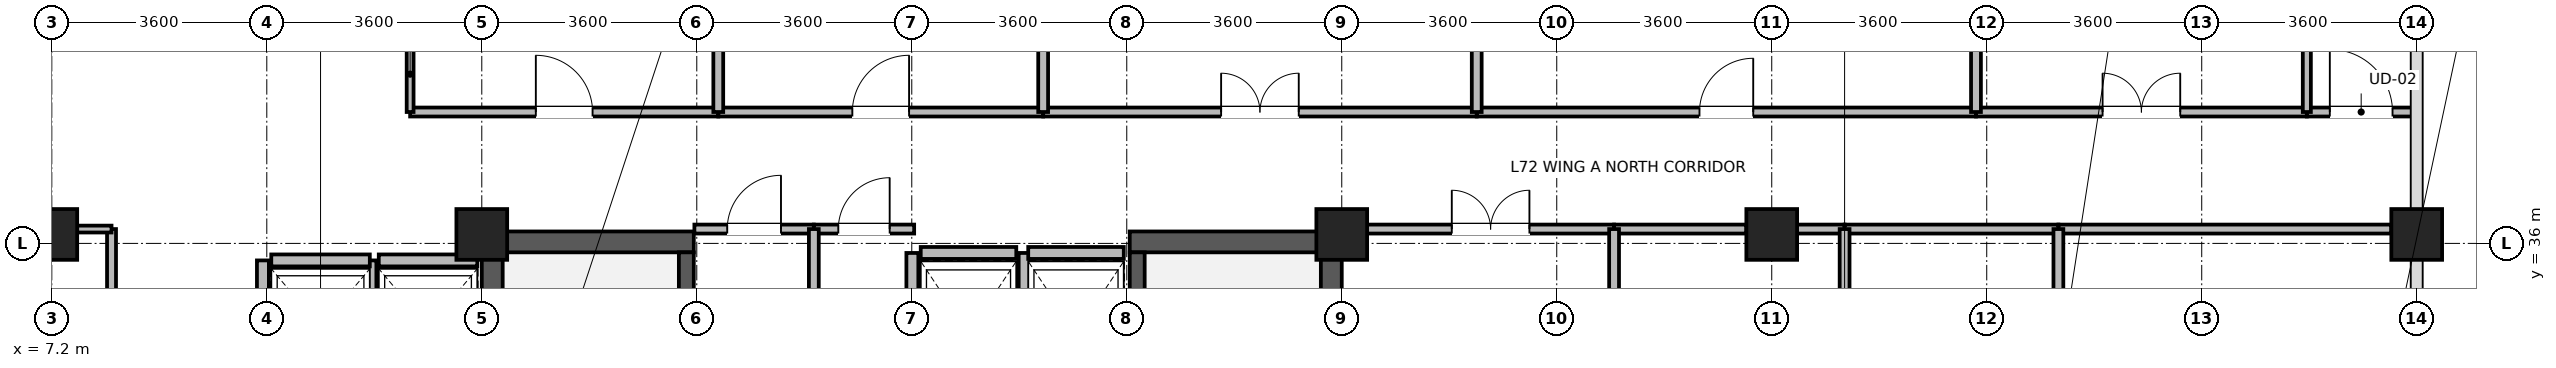
"""IFC4 building model, lengths in metres.
Left out: names, types, materials, properties, quantities, classifications, styles, units other than length and angle.
Written with IfcOpenShell. Run it as: python <this file> out.ifc"""

import sys

from ifc_helpers import new_model, si_unit, direction, frame, frame_2d, origin, origin_2d, place, context, subcontext, project, spatial, rectangle, extrude, source, transform, mapped, element, fill, save


model = new_model("IFC4")
c1 = context("Model", 3, precision=1e-05, world=origin(), true_north=direction((0.0, 1.0)))
c2 = subcontext(c1, "Body", "Model", "MODEL_VIEW")
j1 = project(units=[si_unit("LENGTHUNIT", "METRE"), si_unit("PLANEANGLEUNIT", "RADIAN")], contexts=[c1])
p1 = place(None, origin())
s1 = spatial("IfcSite", under=j1, at=p1, CompositionType="ELEMENT")
p2 = place(p1, origin())
s2 = spatial("IfcBuilding", under=s1, at=p2, CompositionType="ELEMENT")
p3 = place(p2, frame((0.0, 0.0, 279.5)))
s3 = spatial("IfcBuildingStorey", under=s2, at=p3, CompositionType="ELEMENT", Elevation=279.5)
for number, where, z_axis, x_axis in (
    (1, (14.575, 28.5, 0.0), (0.0, 0.0, 1.0), (0.0, 1.0, 0.0)),
    (2, (28.625, 28.5, 0.0), (0.0, 0.0, 1.0), (0.0, 1.0, 0.0)),
):
    element("IfcWall", number, at=place(p3, frame(where, z_axis=z_axis, x_axis=x_axis)), inside=s3, PredefinedType="SHEAR", context=c2, shape_type="SweptSolid", body=[
        extrude(rectangle(XDim=7.7, YDim=0.35, at=frame_2d((3.85, 0.0))), origin(), (0.0, 0.0, 1.0), 3.475),
    ])
for number, where, z_axis, x_axis in (
    (3, (14.75, 36.025, 0.0), (0.0, 0.0, 1.0), (1.0, 0.0, 0.0)),
    (4, (25.25, 36.025, 0.0), (0.0, 0.0, 1.0), (1.0, 0.0, 0.0)),
):
    element("IfcWall", number, at=place(p3, frame(where, z_axis=z_axis, x_axis=x_axis)), inside=s3, PredefinedType="SHEAR", context=c2, shape_type="SweptSolid", body=[
        extrude(rectangle(XDim=3.2, YDim=0.35, at=frame_2d((1.6, 0.0))), origin(), (0.0, 0.0, 1.0), 3.475),
    ])
p4 = place(p3, frame((17.825, 28.85, 0.0), z_axis=(0.0, 0.0, 1.0), x_axis=(0.0, 1.0, 0.0)))
e5 = element("IfcWall", 5, at=p4, inside=s3, PredefinedType="SHEAR", context=c2, shape_type="SweptSolid", body=[
    extrude(rectangle(XDim=7.0, YDim=0.25, at=frame_2d((3.5, 0.0))), origin(), (0.0, 0.0, 1.0), 3.475),
])
p5 = place(p4, frame((0.15, 0.0, 0.0)))
e6 = element("IfcOpeningElement", 6, at=p5, cuts=e5, PredefinedType="OPENING", context=c2, shape_type="SweptSolid", body=[
    extrude(rectangle(XDim=1.1, YDim=2.08, at=frame_2d((0.55, 1.04))), frame((0.0, 0.135, 0.0), z_axis=(0.0, -1.0, 0.0), x_axis=(1.0, 0.0, 0.0)), (0.0, 0.0, 1.0), 0.27),
])
p6 = place(p3, frame((25.375, 28.85, 0.0), z_axis=(0.0, 0.0, 1.0), x_axis=(0.0, 1.0, 0.0)))
e7 = element("IfcWall", 7, at=p6, inside=s3, PredefinedType="SHEAR", context=c2, shape_type="SweptSolid", body=[
    extrude(rectangle(XDim=7.0, YDim=0.25, at=frame_2d((3.5, 0.0))), origin(), (0.0, 0.0, 1.0), 3.475),
])
p7 = place(p6, frame((0.15, 0.0, 0.0)))
e8 = element("IfcOpeningElement", 8, at=p7, cuts=e7, PredefinedType="OPENING", context=c2, shape_type="SweptSolid", body=[
    extrude(rectangle(XDim=1.1, YDim=2.08, at=frame_2d((0.55, 1.04))), frame((0.0, 0.135, 0.0), z_axis=(0.0, -1.0, 0.0), x_axis=(1.0, 0.0, 0.0)), (0.0, 0.0, 1.0), 0.27),
])
m1 = source(origin(), c2, "Body", "SweptSolid", [
    extrude(rectangle(XDim=0.85, YDim=0.85, at=origin_2d()), origin(), (0.0, 0.0, 1.0), 3.7),
])
for number, where, z_axis, x_axis in (
    (9, (7.2, 36.15, 0.0), (0.0, 0.0, 1.0), (1.0, 0.0, 0.0)),
    (10, (14.4, 36.15, 0.0), (0.0, 0.0, 1.0), (1.0, 0.0, 0.0)),
    (11, (28.8, 36.15, 0.0), (0.0, 0.0, 1.0), (1.0, 0.0, 0.0)),
    (12, (36.0, 36.15, 0.0), (0.0, 0.0, 1.0), (1.0, 0.0, 0.0)),
    (13, (46.8, 36.15, 0.0), (0.0, 0.0, 1.0), (1.0, 0.0, 0.0)),
):
    element("IfcColumn", number, at=place(p3, frame(where, z_axis=z_axis, x_axis=x_axis)), inside=s3, PredefinedType="COLUMN", context=c2, shape_type="MappedRepresentation", body=[
        mapped(m1, transform((0.0, 0.0, 0.0), x_axis=(1.0, 0.0, 0.0), y_axis=(0.0, 1.0, 0.0), z_axis=(0.0, 0.0, 1.0), scale=1.0)),
    ])
p8 = place(p3, frame((12.675, 35.715, 0.0), z_axis=(0.0, 0.0, 1.0), x_axis=(1.0, 0.0, 0.0)))
e14 = element("IfcWall", 14, at=p8, inside=s3, PredefinedType="PARTITIONING", context=c2, shape_type="SweptSolid", body=[
    extrude(rectangle(XDim=1.65, YDim=0.2, at=frame_2d((0.825, 0.0))), origin(), (0.0, 0.0, 1.0), 3.455),
])
p9 = place(p3, frame((12.535, 33.485, 0.0), z_axis=(0.0, 0.0, 1.0), x_axis=(0.0, 1.0, 0.0)))
e15 = element("IfcWall", 15, at=p9, inside=s3, PredefinedType="PARTITIONING", context=c2, shape_type="SweptSolid", body=[
    extrude(rectangle(XDim=2.23, YDim=0.2, at=frame_2d((1.115, 0.0))), origin(), (0.0, 0.0, 1.0), 3.455),
])
p10 = place(p3, frame((10.875, 35.715, 0.0), z_axis=(0.0, 0.0, 1.0), x_axis=(1.0, 0.0, 0.0)))
e16 = element("IfcWall", 16, at=p10, inside=s3, PredefinedType="PARTITIONING", context=c2, shape_type="SweptSolid", body=[
    extrude(rectangle(XDim=1.65, YDim=0.2, at=frame_2d((0.825, 0.0))), origin(), (0.0, 0.0, 1.0), 3.455),
])
p11 = place(p3, frame((10.735, 33.485, 0.0), z_axis=(0.0, 0.0, 1.0), x_axis=(0.0, 1.0, 0.0)))
e17 = element("IfcWall", 17, at=p11, inside=s3, PredefinedType="PARTITIONING", context=c2, shape_type="SweptSolid", body=[
    extrude(rectangle(XDim=2.23, YDim=0.2, at=frame_2d((1.115, 0.0))), origin(), (0.0, 0.0, 1.0), 3.455),
])
p12 = place(p3, frame((21.75, 35.84, 0.0), z_axis=(0.0, 0.0, 1.0), x_axis=(1.0, 0.0, 0.0)))
e18 = element("IfcWall", 18, at=p12, inside=s3, PredefinedType="PARTITIONING", context=c2, shape_type="SweptSolid", body=[
    extrude(rectangle(XDim=1.6, YDim=0.2, at=frame_2d((0.8, 0.0))), origin(), (0.0, 0.0, 1.0), 2.555),
])
for number, where, z_axis, x_axis in (
    (19, (21.61, 33.16, 0.0), (0.0, 0.0, 1.0), (0.0, 1.0, 0.0)),
    (20, (23.49, 33.16, 0.0), (0.0, 0.0, 1.0), (0.0, 1.0, 0.0)),
):
    element("IfcWall", number, at=place(p3, frame(where, z_axis=z_axis, x_axis=x_axis)), inside=s3, PredefinedType="PARTITIONING", context=c2, shape_type="SweptSolid", body=[
        extrude(rectangle(XDim=2.68, YDim=0.2, at=frame_2d((1.34, 0.0))), origin(), (0.0, 0.0, 1.0), 3.455),
    ])
p13 = place(p3, frame((23.55, 35.84, 0.0), z_axis=(0.0, 0.0, 1.0), x_axis=(1.0, 0.0, 0.0)))
e21 = element("IfcWall", 21, at=p13, inside=s3, PredefinedType="PARTITIONING", context=c2, shape_type="SweptSolid", body=[
    extrude(rectangle(XDim=1.6, YDim=0.2, at=frame_2d((0.8, 0.0))), origin(), (0.0, 0.0, 1.0), 2.555),
])
p14 = place(p3, frame((31.06, 38.2, 0.0), z_axis=(0.0, 0.0, 1.0), x_axis=(1.0, 0.0, 0.0)))
e22 = element("IfcWall", 22, at=p14, inside=s3, PredefinedType="PARTITIONING", context=c2, shape_type="SweptSolid", body=[
    extrude(rectangle(XDim=8.36, YDim=0.15, at=frame_2d((4.18, 0.0))), origin(), (0.0, 0.0, 1.0), 3.455),
])
p15 = place(p14, frame((3.73, 0.0, 0.0)))
e23 = element("IfcOpeningElement", 23, at=p15, cuts=e22, PredefinedType="OPENING", context=c2, shape_type="SweptSolid", body=[
    extrude(rectangle(XDim=0.9, YDim=2.08, at=frame_2d((0.45, 1.04))), frame((0.0, 0.085, 0.0), z_axis=(0.0, -1.0, 0.0), x_axis=(1.0, 0.0, 0.0)), (0.0, 0.0, 1.0), 0.17),
])
p16 = place(p3, frame((23.8, 38.2, 0.0), z_axis=(0.0, 0.0, 1.0), x_axis=(1.0, 0.0, 0.0)))
e24 = element("IfcWall", 24, at=p16, inside=s3, PredefinedType="PARTITIONING", context=c2, shape_type="SweptSolid", body=[
    extrude(rectangle(XDim=7.26, YDim=0.15, at=frame_2d((3.63, 0.0))), origin(), (0.0, 0.0, 1.0), 3.455),
])
p17 = place(p16, frame((2.98, 0.0, 0.0)))
e25 = element("IfcOpeningElement", 25, at=p17, cuts=e24, PredefinedType="OPENING", context=c2, shape_type="SweptSolid", body=[
    extrude(rectangle(XDim=1.3, YDim=2.12, at=frame_2d((0.65, 1.06))), frame((0.0, 0.085, 0.0), z_axis=(0.0, -1.0, 0.0), x_axis=(1.0, 0.0, 0.0)), (0.0, 0.0, 1.0), 0.17),
])
p18 = place(p3, frame((40.8, 36.24, 0.0), z_axis=(0.0, 0.0, 1.0), x_axis=(1.0, 0.0, 0.0)))
e26 = element("IfcWall", 26, at=p18, inside=s3, PredefinedType="PARTITIONING", context=c2, shape_type="SweptSolid", body=[
    extrude(rectangle(XDim=5.575, YDim=0.15, at=frame_2d((2.788, 0.0))), origin(), (0.0, 0.0, 1.0), 2.905),
])
p19 = place(p3, frame((39.42, 38.2, 0.0), z_axis=(0.0, 0.0, 1.0), x_axis=(1.0, 0.0, 0.0)))
e27 = element("IfcWall", 27, at=p19, inside=s3, PredefinedType="PARTITIONING", context=c2, shape_type="SweptSolid", body=[
    extrude(rectangle(XDim=5.54, YDim=0.15, at=frame_2d((2.77, 0.0))), origin(), (0.0, 0.0, 1.0), 3.455),
])
p20 = place(p19, frame((2.12, 0.0, 0.0)))
e28 = element("IfcOpeningElement", 28, at=p20, cuts=e27, PredefinedType="OPENING", context=c2, shape_type="SweptSolid", body=[
    extrude(rectangle(XDim=1.3, YDim=2.12, at=frame_2d((0.65, 1.06))), frame((0.0, 0.085, 0.0), z_axis=(0.0, -1.0, 0.0), x_axis=(1.0, 0.0, 0.0)), (0.0, 0.0, 1.0), 0.17),
])
p21 = place(p3, frame((18.36, 38.2, 0.0), z_axis=(0.0, 0.0, 1.0), x_axis=(1.0, 0.0, 0.0)))
e29 = element("IfcWall", 29, at=p21, inside=s3, PredefinedType="PARTITIONING", context=c2, shape_type="SweptSolid", body=[
    extrude(rectangle(XDim=5.44, YDim=0.15, at=frame_2d((2.72, 0.0))), origin(), (0.0, 0.0, 1.0), 3.455),
])
p22 = place(p21, frame((2.245, 0.0, 0.0)))
e30 = element("IfcOpeningElement", 30, at=p22, cuts=e29, PredefinedType="OPENING", context=c2, shape_type="SweptSolid", body=[
    extrude(rectangle(XDim=0.95, YDim=2.1, at=frame_2d((0.475, 1.05))), frame((0.0, 0.085, 0.0), z_axis=(0.0, -1.0, 0.0), x_axis=(1.0, 0.0, 0.0)), (0.0, 0.0, 1.0), 0.17),
])
p23 = place(p3, frame((13.2, 38.2, 0.0), z_axis=(0.0, 0.0, 1.0), x_axis=(1.0, 0.0, 0.0)))
e31 = element("IfcWall", 31, at=p23, inside=s3, PredefinedType="PARTITIONING", context=c2, shape_type="SweptSolid", body=[
    extrude(rectangle(XDim=5.16, YDim=0.15, at=frame_2d((2.58, 0.0))), origin(), (0.0, 0.0, 1.0), 3.455),
])
p24 = place(p23, frame((2.105, 0.0, 0.0)))
e32 = element("IfcOpeningElement", 32, at=p24, cuts=e31, PredefinedType="OPENING", context=c2, shape_type="SweptSolid", body=[
    extrude(rectangle(XDim=0.95, YDim=2.1, at=frame_2d((0.475, 1.05))), frame((0.0, 0.085, 0.0), z_axis=(0.0, -1.0, 0.0), x_axis=(1.0, 0.0, 0.0)), (0.0, 0.0, 1.0), 0.17),
])
p25 = place(p3, frame((29.225, 36.24, 0.0), z_axis=(0.0, 0.0, 1.0), x_axis=(1.0, 0.0, 0.0)))
e33 = element("IfcWall", 33, at=p25, inside=s3, PredefinedType="PARTITIONING", context=c2, shape_type="SweptSolid", body=[
    extrude(rectangle(XDim=4.135, YDim=0.15, at=frame_2d((2.067, 0.0))), origin(), (0.0, 0.0, 1.0), 2.905),
])
p26 = place(p25, frame((1.417, 0.0, 0.0)))
e34 = element("IfcOpeningElement", 34, at=p26, cuts=e33, PredefinedType="OPENING", context=c2, shape_type="SweptSolid", body=[
    extrude(rectangle(XDim=1.3, YDim=2.12, at=frame_2d((0.65, 1.06))), frame((0.0, 0.085, 0.0), z_axis=(0.0, -1.0, 0.0), x_axis=(1.0, 0.0, 0.0)), (0.0, 0.0, 1.0), 0.17),
])
p27 = place(p3, frame((33.36, 36.24, 0.0), z_axis=(0.0, 0.0, 1.0), x_axis=(1.0, 0.0, 0.0)))
e35 = element("IfcWall", 35, at=p27, inside=s3, PredefinedType="PARTITIONING", context=c2, shape_type="SweptSolid", body=[
    extrude(rectangle(XDim=2.215, YDim=0.15, at=frame_2d((1.107, 0.0))), origin(), (0.0, 0.0, 1.0), 2.905),
])
p28 = place(p3, frame((36.425, 36.24, 0.0), z_axis=(0.0, 0.0, 1.0), x_axis=(1.0, 0.0, 0.0)))
e36 = element("IfcWall", 36, at=p28, inside=s3, PredefinedType="PARTITIONING", context=c2, shape_type="SweptSolid", body=[
    extrude(rectangle(XDim=0.795, YDim=0.15, at=frame_2d((0.397, 0.0))), origin(), (0.0, 0.0, 1.0), 2.905),
])
p29 = place(p3, frame((8.2, 32.4, 0.0), z_axis=(0.0, 0.0, 1.0), x_axis=(0.0, 1.0, 0.0)))
e37 = element("IfcWall", 37, at=p29, inside=s3, PredefinedType="PARTITIONING", context=c2, shape_type="SweptSolid", body=[
    extrude(rectangle(XDim=3.84, YDim=0.15, at=frame_2d((1.92, 0.0))), origin(), (0.0, 0.0, 1.0), 3.455),
])
p30 = place(p29, frame((1.445, 0.0, 0.0)))
e38 = element("IfcOpeningElement", 38, at=p30, cuts=e37, PredefinedType="OPENING", context=c2, shape_type="SweptSolid", body=[
    extrude(rectangle(XDim=0.95, YDim=2.1, at=frame_2d((0.475, 1.05))), frame((0.0, 0.085, 0.0), z_axis=(0.0, -1.0, 0.0), x_axis=(1.0, 0.0, 0.0)), (0.0, 0.0, 1.0), 0.17),
])
p31 = place(p3, frame((37.22, 36.24, 0.0), z_axis=(0.0, 0.0, 1.0), x_axis=(1.0, 0.0, 0.0)))
e39 = element("IfcWall", 39, at=p31, inside=s3, PredefinedType="PARTITIONING", context=c2, shape_type="SweptSolid", body=[
    extrude(rectangle(XDim=3.58, YDim=0.15, at=frame_2d((1.79, 0.0))), origin(), (0.0, 0.0, 1.0), 2.905),
])
p32 = place(p3, frame((17.96, 36.24, 0.0), z_axis=(0.0, 0.0, 1.0), x_axis=(1.0, 0.0, 0.0)))
e40 = element("IfcWall", 40, at=p32, inside=s3, PredefinedType="PARTITIONING", context=c2, shape_type="SweptSolid", body=[
    extrude(rectangle(XDim=2.0, YDim=0.15, at=frame_2d((1.0, 0.0))), origin(), (0.0, 0.0, 1.0), 2.555),
])
p33 = place(p32, frame((0.55, 0.0, 0.0)))
e41 = element("IfcOpeningElement", 41, at=p33, cuts=e40, PredefinedType="OPENING", context=c2, shape_type="SweptSolid", body=[
    extrude(rectangle(XDim=0.9, YDim=2.08, at=frame_2d((0.45, 1.04))), frame((0.0, 0.085, 0.0), z_axis=(0.0, -1.0, 0.0), x_axis=(1.0, 0.0, 0.0)), (0.0, 0.0, 1.0), 0.17),
])
p34 = place(p3, frame((44.96, 38.2, 0.0), z_axis=(0.0, 0.0, 1.0), x_axis=(1.0, 0.0, 0.0)))
e42 = element("IfcWall", 42, at=p34, inside=s3, PredefinedType="PARTITIONING", context=c2, shape_type="SweptSolid", body=[
    extrude(rectangle(XDim=1.82, YDim=0.15, at=frame_2d((0.91, 0.0))), origin(), (0.0, 0.0, 1.0), 3.455),
])
p35 = place(p34, frame((0.385, 0.0, 0.0)))
e43 = element("IfcOpeningElement", 43, at=p35, cuts=e42, PredefinedType="OPENING", context=c2, shape_type="SweptSolid", body=[
    extrude(rectangle(XDim=1.05, YDim=2.12, at=frame_2d((0.525, 1.06))), frame((0.0, 0.085, 0.0), z_axis=(0.0, -1.0, 0.0), x_axis=(1.0, 0.0, 0.0)), (0.0, 0.0, 1.0), 0.17),
])
p36 = place(p3, frame((19.96, 36.24, 0.0), z_axis=(0.0, 0.0, 1.0), x_axis=(1.0, 0.0, 0.0)))
e44 = element("IfcWall", 44, at=p36, inside=s3, PredefinedType="PARTITIONING", context=c2, shape_type="SweptSolid", body=[
    extrude(rectangle(XDim=1.68, YDim=0.15, at=frame_2d((0.84, 0.0))), origin(), (0.0, 0.0, 1.0), 2.555),
])
p37 = place(p36, frame((0.41, 0.0, 0.0)))
e45 = element("IfcOpeningElement", 45, at=p37, cuts=e44, PredefinedType="OPENING", context=c2, shape_type="SweptSolid", body=[
    extrude(rectangle(XDim=0.86, YDim=2.02, at=frame_2d((0.43, 1.01))), frame((0.0, 0.085, 0.0), z_axis=(0.0, -1.0, 0.0), x_axis=(1.0, 0.0, 0.0)), (0.0, 0.0, 1.0), 0.17),
])
for number, where, z_axis, x_axis in (
    (46, (37.22, 28.56, 0.0), (0.0, 0.0, 1.0), (0.0, 1.0, 0.0)),
    (47, (40.8, 28.56, 0.0), (0.0, 0.0, 1.0), (0.0, 1.0, 0.0)),
):
    element("IfcWall", number, at=place(p3, frame(where, z_axis=z_axis, x_axis=x_axis)), inside=s3, PredefinedType="PARTITIONING", context=c2, shape_type="SweptSolid", body=[
        extrude(rectangle(XDim=7.68, YDim=0.165, at=frame_2d((3.84, 0.0))), origin(), (0.0, 0.0, 1.0), 3.455),
    ])
p38 = place(p3, frame((13.2, 38.2, 0.0), z_axis=(0.0, 0.0, 1.0), x_axis=(0.0, 1.0, 0.0)))
e48 = element("IfcWall", 48, at=p38, inside=s3, PredefinedType="PARTITIONING", context=c2, shape_type="SweptSolid", body=[
    extrude(rectangle(XDim=1.268, YDim=0.115, at=frame_2d((0.634, 0.0))), origin(), (0.0, 0.0, 1.0), 3.455),
])
for number, where, z_axis, x_axis in (
    (49, (18.36, 38.2, 0.0), (0.0, 0.0, 1.0), (0.0, 1.0, 0.0)),
    (50, (23.8, 38.2, 0.0), (0.0, 0.0, 1.0), (0.0, 1.0, 0.0)),
    (51, (31.06, 38.2, 0.0), (0.0, 0.0, 1.0), (0.0, 1.0, 0.0)),
    (52, (39.42, 38.2, 0.0), (0.0, 0.0, 1.0), (0.0, 1.0, 0.0)),
):
    element("IfcWall", number, at=place(p3, frame(where, z_axis=z_axis, x_axis=x_axis)), inside=s3, PredefinedType="PARTITIONING", context=c2, shape_type="SweptSolid", body=[
        extrude(rectangle(XDim=4.868, YDim=0.165, at=frame_2d((2.434, 0.0))), origin(), (0.0, 0.0, 1.0), 3.455),
    ])
p39 = place(p3, frame((44.96, 38.2, 0.0), z_axis=(0.0, 0.0, 1.0), x_axis=(0.0, 1.0, 0.0)))
e53 = element("IfcWall", 53, at=p39, inside=s3, PredefinedType="PARTITIONING", context=c2, shape_type="SweptSolid", body=[
    extrude(rectangle(XDim=4.868, YDim=0.135, at=frame_2d((2.434, 0.0))), origin(), (0.0, 0.0, 1.0), 3.455),
])
p40 = place(p3, frame((7.625, 36.24, 0.0), z_axis=(0.0, 0.0, 1.0), x_axis=(1.0, 0.0, 0.0)))
e54 = element("IfcWall", 54, at=p40, inside=s3, PredefinedType="PARTITIONING", context=c2, shape_type="SweptSolid", body=[
    extrude(rectangle(XDim=0.575, YDim=0.115, at=frame_2d((0.288, 0.0))), origin(), (0.0, 0.0, 1.0), 2.905),
])
p41 = place(p3, frame((33.36, 32.4, 0.0), z_axis=(0.0, 0.0, 1.0), x_axis=(0.0, 1.0, 0.0)))
e55 = element("IfcWall", 55, at=p41, inside=s3, PredefinedType="PARTITIONING", context=c2, shape_type="SweptSolid", body=[
    extrude(rectangle(XDim=3.84, YDim=0.165, at=frame_2d((1.92, 0.0))), origin(), (0.0, 0.0, 1.0), 3.455),
])
p42 = place(p3, frame((19.96, 33.36, 0.0), z_axis=(0.0, 0.0, 1.0), x_axis=(0.0, 1.0, 0.0)))
e56 = element("IfcWall", 56, at=p42, inside=s3, PredefinedType="PARTITIONING", context=c2, shape_type="SweptSolid", body=[
    extrude(rectangle(XDim=2.88, YDim=0.165, at=frame_2d((1.44, 0.0))), origin(), (0.0, 0.0, 1.0), 3.455),
])
p43 = place(p15, origin())
e57 = element("IfcDoor", 57, at=p43, inside=s3, OperationType="SINGLE_SWING_RIGHT", PredefinedType="DOOR", context=c2, shape_type="SweptSolid", body=[
    extrude(rectangle(XDim=0.9, YDim=2.08, at=frame_2d((0.45, 1.04))), frame((0.0, 0.025, 0.0), z_axis=(0.0, -1.0, 0.0), x_axis=(1.0, 0.0, 0.0)), (0.0, 0.0, 1.0), 0.05),
])
fill(e23, e57)
p44 = place(p17, origin())
e58 = element("IfcDoor", 58, at=p44, inside=s3, OperationType="DOUBLE_DOOR_SINGLE_SWING", PredefinedType="DOOR", context=c2, shape_type="SweptSolid", body=[
    extrude(rectangle(XDim=1.3, YDim=2.12, at=frame_2d((0.65, 1.06))), frame((0.0, 0.025, 0.0), z_axis=(0.0, -1.0, 0.0), x_axis=(1.0, 0.0, 0.0)), (0.0, 0.0, 1.0), 0.05),
])
fill(e25, e58)
p45 = place(p20, origin())
e59 = element("IfcDoor", 59, at=p45, inside=s3, OperationType="DOUBLE_DOOR_SINGLE_SWING", PredefinedType="DOOR", context=c2, shape_type="SweptSolid", body=[
    extrude(rectangle(XDim=1.3, YDim=2.12, at=frame_2d((0.65, 1.06))), frame((0.0, 0.025, 0.0), z_axis=(0.0, -1.0, 0.0), x_axis=(1.0, 0.0, 0.0)), (0.0, 0.0, 1.0), 0.05),
])
fill(e28, e59)
p46 = place(p22, origin())
e60 = element("IfcDoor", 60, at=p46, inside=s3, OperationType="SINGLE_SWING_RIGHT", PredefinedType="DOOR", context=c2, shape_type="SweptSolid", body=[
    extrude(rectangle(XDim=0.95, YDim=2.1, at=frame_2d((0.475, 1.05))), frame((0.0, 0.025, 0.0), z_axis=(0.0, -1.0, 0.0), x_axis=(1.0, 0.0, 0.0)), (0.0, 0.0, 1.0), 0.05),
])
fill(e30, e60)
p47 = place(p24, origin())
e61 = element("IfcDoor", 61, at=p47, inside=s3, OperationType="SINGLE_SWING_LEFT", PredefinedType="DOOR", context=c2, shape_type="SweptSolid", body=[
    extrude(rectangle(XDim=0.95, YDim=2.1, at=frame_2d((0.475, 1.05))), frame((0.0, 0.025, 0.0), z_axis=(0.0, -1.0, 0.0), x_axis=(1.0, 0.0, 0.0)), (0.0, 0.0, 1.0), 0.05),
])
fill(e32, e61)
p48 = place(p26, origin())
e62 = element("IfcDoor", 62, at=p48, inside=s3, OperationType="DOUBLE_DOOR_SINGLE_SWING", PredefinedType="DOOR", context=c2, shape_type="SweptSolid", body=[
    extrude(rectangle(XDim=1.3, YDim=2.12, at=frame_2d((0.65, 1.06))), frame((0.0, 0.025, 0.0), z_axis=(0.0, -1.0, 0.0), x_axis=(1.0, 0.0, 0.0)), (0.0, 0.0, 1.0), 0.05),
])
fill(e34, e62)
p49 = place(p33, origin())
e63 = element("IfcDoor", 63, at=p49, inside=s3, OperationType="SINGLE_SWING_RIGHT", PredefinedType="DOOR", context=c2, shape_type="SweptSolid", body=[
    extrude(rectangle(XDim=0.9, YDim=2.08, at=frame_2d((0.45, 1.04))), frame((0.0, 0.025, 0.0), z_axis=(0.0, -1.0, 0.0), x_axis=(1.0, 0.0, 0.0)), (0.0, 0.0, 1.0), 0.05),
])
fill(e41, e63)
p50 = place(p35, origin())
e64 = element("IfcDoor", 64, at=p50, inside=s3, OperationType="SINGLE_SWING_LEFT", PredefinedType="DOOR", context=c2, shape_type="SweptSolid", body=[
    extrude(rectangle(XDim=1.05, YDim=2.12, at=frame_2d((0.525, 1.06))), frame((0.0, 0.025, 0.0), z_axis=(0.0, -1.0, 0.0), x_axis=(1.0, 0.0, 0.0)), (0.0, 0.0, 1.0), 0.05),
])
fill(e43, e64)
p51 = place(p37, origin())
e65 = element("IfcDoor", 65, at=p51, inside=s3, OperationType="SINGLE_SWING_RIGHT", PredefinedType="DOOR", context=c2, shape_type="SweptSolid", body=[
    extrude(rectangle(XDim=0.86, YDim=2.02, at=frame_2d((0.43, 1.01))), frame((0.0, 0.025, 0.0), z_axis=(0.0, -1.0, 0.0), x_axis=(1.0, 0.0, 0.0)), (0.0, 0.0, 1.0), 0.05),
])
fill(e45, e65)
save(model, sys.argv[1])
